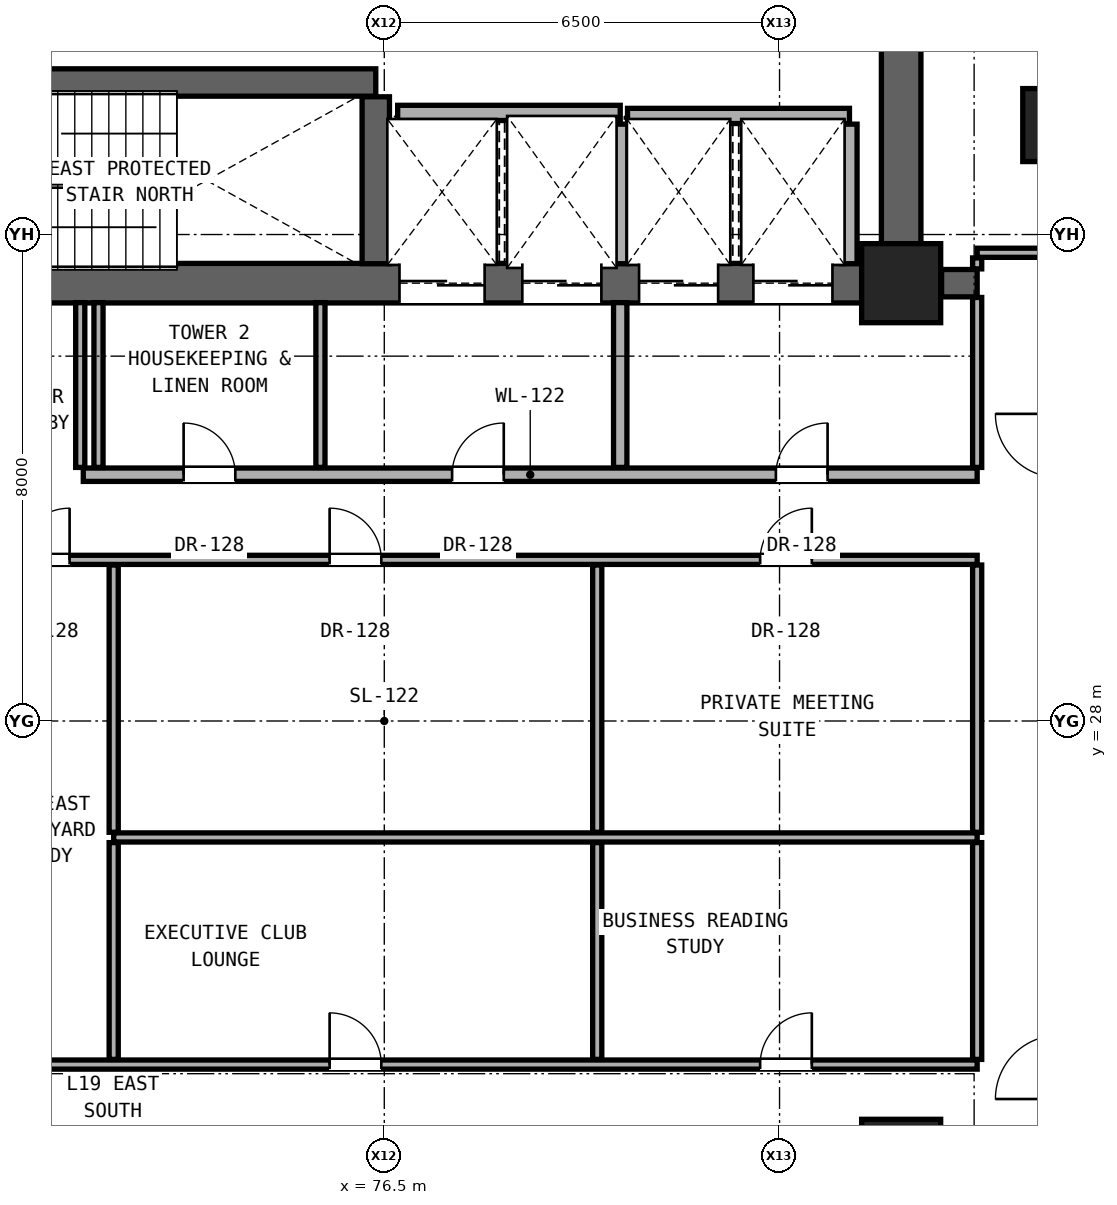
"""IFC4 building model, lengths in metres.
Left out: names, types, materials, properties, quantities, classifications, styles, units other than length and angle.
Written with IfcOpenShell. Run it as: python <this file> out.ifc"""

import sys

from ifc_helpers import new_model, si_unit, direction, frame, frame_2d, origin, origin_2d, place, context, subcontext, project, spatial, rectangle, extrude, element, fill, save


model = new_model("IFC4")
c1 = context("Model", 3, precision=1e-05, world=origin(), true_north=direction((0.0, 1.0)))
c2 = subcontext(c1, "Body", "Model", "MODEL_VIEW")
j1 = project(units=[si_unit("LENGTHUNIT", "METRE"), si_unit("PLANEANGLEUNIT", "RADIAN")], contexts=[c1])
p1 = place(None, origin())
s1 = spatial("IfcSite", under=j1, at=p1, CompositionType="ELEMENT")
p2 = place(p1, origin())
s2 = spatial("IfcBuilding", under=s1, at=p2, CompositionType="ELEMENT")
p3 = place(p2, frame((0.0, 0.0, 68.6)))
s3 = spatial("IfcBuildingStorey", under=s2, at=p3, CompositionType="ELEMENT", Elevation=68.6)
for number, where, z_axis, x_axis in (
    (1, (85.0, 20.8, 0.0), (0.0, 0.0, 1.0), (1.0, 0.0, 0.0)),
    (2, (85.0, 35.2, 0.0), (0.0, 0.0, 1.0), (1.0, 0.0, 0.0)),
):
    element("IfcColumn", number, at=place(p3, frame(where, z_axis=z_axis, x_axis=x_axis)), inside=s3, PredefinedType="COLUMN", context=c2, shape_type="SweptSolid", body=[
        extrude(rectangle(XDim=1.3, YDim=1.3, at=origin_2d()), origin(), (0.0, 0.0, 1.0), 3.3),
    ])
p4 = place(p3, frame((87.4, 37.8, 0.0), z_axis=(0.0, 0.0, 1.0), x_axis=(1.0, 0.0, 0.0)))
e3 = element("IfcColumn", 3, at=p4, inside=s3, PredefinedType="PILASTER", context=c2, shape_type="SweptSolid", body=[
    extrude(rectangle(XDim=0.8, YDim=1.2, at=origin_2d()), origin(), (0.0, 0.0, 1.0), 3.3),
])
p5 = place(p3, frame((85.0, 35.2, 0.0), z_axis=(0.0, 0.0, 1.0), x_axis=(0.0, 1.0, 0.0)))
e4 = element("IfcWall", 4, at=p5, inside=s3, PredefinedType="SHEAR", context=c2, shape_type="SweptSolid", body=[
    extrude(rectangle(XDim=5.6, YDim=0.65, at=frame_2d((2.8, 0.0))), origin(), (0.0, 0.0, 1.0), 3.06),
])
p6 = place(p3, frame((68.0, 35.2, 0.0), z_axis=(0.0, 0.0, 1.0), x_axis=(1.0, 0.0, 0.0)))
e5 = element("IfcWall", 5, at=p6, inside=s3, PredefinedType="SHEAR", context=c2, shape_type="SweptSolid", body=[
    extrude(rectangle(XDim=17.0, YDim=0.65, at=frame_2d((8.5, 0.0))), origin(), (0.0, 0.0, 1.0), 3.06),
])
p7 = place(p6, frame((1.06, 0.0, 0.0)))
e6 = element("IfcOpeningElement", 6, at=p7, cuts=e5, PredefinedType="OPENING", context=c2, shape_type="SweptSolid", body=[
    extrude(rectangle(XDim=1.15, YDim=2.2, at=frame_2d((0.575, 1.1))), frame((0.0, 0.335, 0.0), z_axis=(0.0, -1.0, 0.0), x_axis=(1.0, 0.0, 0.0)), (0.0, 0.0, 1.0), 0.67),
])
p8 = place(p6, frame((8.75, 0.0, 0.0)))
e7 = element("IfcOpeningElement", 7, at=p8, cuts=e5, PredefinedType="OPENING", context=c2, shape_type="SweptSolid", body=[
    extrude(rectangle(XDim=1.4, YDim=2.35, at=frame_2d((0.7, 1.175))), frame((0.0, 0.335, 0.0), z_axis=(0.0, -1.0, 0.0), x_axis=(1.0, 0.0, 0.0)), (0.0, 0.0, 1.0), 0.67),
])
p9 = place(p6, frame((10.77, 0.0, 0.0)))
e8 = element("IfcOpeningElement", 8, at=p9, cuts=e5, PredefinedType="OPENING", context=c2, shape_type="SweptSolid", body=[
    extrude(rectangle(XDim=1.3, YDim=2.3, at=frame_2d((0.65, 1.15))), frame((0.0, 0.335, 0.0), z_axis=(0.0, -1.0, 0.0), x_axis=(1.0, 0.0, 0.0)), (0.0, 0.0, 1.0), 0.67),
])
p10 = place(p6, frame((12.69, 0.0, 0.0)))
e9 = element("IfcOpeningElement", 9, at=p10, cuts=e5, PredefinedType="OPENING", context=c2, shape_type="SweptSolid", body=[
    extrude(rectangle(XDim=1.3, YDim=2.3, at=frame_2d((0.65, 1.15))), frame((0.0, 0.335, 0.0), z_axis=(0.0, -1.0, 0.0), x_axis=(1.0, 0.0, 0.0)), (0.0, 0.0, 1.0), 0.67),
])
p11 = place(p6, frame((14.57, 0.0, 0.0)))
e10 = element("IfcOpeningElement", 10, at=p11, cuts=e5, PredefinedType="OPENING", context=c2, shape_type="SweptSolid", body=[
    extrude(rectangle(XDim=1.3, YDim=2.3, at=frame_2d((0.65, 1.15))), frame((0.0, 0.335, 0.0), z_axis=(0.0, -1.0, 0.0), x_axis=(1.0, 0.0, 0.0)), (0.0, 0.0, 1.0), 0.67),
])
p12 = place(p3, frame((66.62, 22.35, 0.0), z_axis=(0.0, 0.0, 1.0), x_axis=(1.0, 0.0, 0.0)))
e11 = element("IfcWall", 11, at=p12, inside=s3, PredefinedType="PARTITIONING", context=c2, shape_type="SweptSolid", body=[
    extrude(rectangle(XDim=19.63, YDim=0.15, at=frame_2d((9.815, 0.0))), origin(), (0.0, 0.0, 1.0), 2.125),
])
p13 = place(p12, frame((8.981, 0.0, 0.0)))
e12 = element("IfcOpeningElement", 12, at=p13, cuts=e11, PredefinedType="OPENING", context=c2, shape_type="SweptSolid", body=[
    extrude(rectangle(XDim=0.85, YDim=2.01, at=frame_2d((0.425, 1.005))), frame((0.0, 0.085, 0.0), z_axis=(0.0, -1.0, 0.0), x_axis=(1.0, 0.0, 0.0)), (0.0, 0.0, 1.0), 0.17),
])
p14 = place(p12, frame((16.061, 0.0, 0.0)))
e13 = element("IfcOpeningElement", 13, at=p14, cuts=e11, PredefinedType="OPENING", context=c2, shape_type="SweptSolid", body=[
    extrude(rectangle(XDim=0.85, YDim=2.01, at=frame_2d((0.425, 1.005))), frame((0.0, 0.085, 0.0), z_axis=(0.0, -1.0, 0.0), x_axis=(1.0, 0.0, 0.0)), (0.0, 0.0, 1.0), 0.17),
])
p15 = place(p3, frame((72.05, 26.085, 0.0), z_axis=(0.0, 0.0, 1.0), x_axis=(1.0, 0.0, 0.0)))
e14 = element("IfcWall", 14, at=p15, inside=s3, PredefinedType="PARTITIONING", context=c2, shape_type="SweptSolid", body=[
    extrude(rectangle(XDim=14.2, YDim=0.15, at=frame_2d((7.1, 0.0))), origin(), (0.0, 0.0, 1.0), 2.125),
])
p16 = place(p3, frame((66.62, 30.65, 0.0), z_axis=(0.0, 0.0, 1.0), x_axis=(1.0, 0.0, 0.0)))
e15 = element("IfcWall", 15, at=p16, inside=s3, PredefinedType="PARTITIONING", context=c2, shape_type="SweptSolid", body=[
    extrude(rectangle(XDim=19.63, YDim=0.15, at=frame_2d((9.815, 0.0))), origin(), (0.0, 0.0, 1.0), 2.125),
])
p17 = place(p16, frame((3.855, 0.0, 0.0)))
e16 = element("IfcOpeningElement", 16, at=p17, cuts=e15, PredefinedType="OPENING", context=c2, shape_type="SweptSolid", body=[
    extrude(rectangle(XDim=0.85, YDim=2.01, at=frame_2d((0.425, 1.005))), frame((0.0, 0.085, 0.0), z_axis=(0.0, -1.0, 0.0), x_axis=(1.0, 0.0, 0.0)), (0.0, 0.0, 1.0), 0.17),
])
p18 = place(p16, frame((8.981, 0.0, 0.0)))
e17 = element("IfcOpeningElement", 17, at=p18, cuts=e15, PredefinedType="OPENING", context=c2, shape_type="SweptSolid", body=[
    extrude(rectangle(XDim=0.85, YDim=2.01, at=frame_2d((0.425, 1.005))), frame((0.0, 0.085, 0.0), z_axis=(0.0, -1.0, 0.0), x_axis=(1.0, 0.0, 0.0)), (0.0, 0.0, 1.0), 0.17),
])
p19 = place(p16, frame((16.061, 0.0, 0.0)))
e18 = element("IfcOpeningElement", 18, at=p19, cuts=e15, PredefinedType="OPENING", context=c2, shape_type="SweptSolid", body=[
    extrude(rectangle(XDim=0.85, YDim=2.01, at=frame_2d((0.425, 1.005))), frame((0.0, 0.085, 0.0), z_axis=(0.0, -1.0, 0.0), x_axis=(1.0, 0.0, 0.0)), (0.0, 0.0, 1.0), 0.17),
])
p20 = place(p3, frame((71.55, 32.05, 0.0), z_axis=(0.0, 0.0, 1.0), x_axis=(1.0, 0.0, 0.0)))
e19 = element("IfcWall", 19, at=p20, inside=s3, PredefinedType="SOLIDWALL", context=c2, shape_type="SweptSolid", body=[
    extrude(rectangle(XDim=14.7, YDim=0.22, at=frame_2d((7.35, 0.0))), origin(), (0.0, 0.0, 1.0), 2.125),
])
p21 = place(p20, frame((11.39, 0.0, 0.0)))
e20 = element("IfcOpeningElement", 20, at=p21, cuts=e19, PredefinedType="OPENING", context=c2, shape_type="SweptSolid", body=[
    extrude(rectangle(XDim=0.85, YDim=2.01, at=frame_2d((0.425, 1.005))), frame((0.0, 0.12, 0.0), z_axis=(0.0, -1.0, 0.0), x_axis=(1.0, 0.0, 0.0)), (0.0, 0.0, 1.0), 0.24),
])
p22 = place(p20, frame((6.065, 0.0, 0.0)))
e21 = element("IfcOpeningElement", 21, at=p22, cuts=e19, PredefinedType="OPENING", context=c2, shape_type="SweptSolid", body=[
    extrude(rectangle(XDim=0.85, YDim=2.01, at=frame_2d((0.425, 1.005))), frame((0.0, 0.12, 0.0), z_axis=(0.0, -1.0, 0.0), x_axis=(1.0, 0.0, 0.0)), (0.0, 0.0, 1.0), 0.24),
])
p23 = place(p20, frame((1.65, 0.0, 0.0)))
e22 = element("IfcOpeningElement", 22, at=p23, cuts=e19, PredefinedType="OPENING", context=c2, shape_type="SweptSolid", body=[
    extrude(rectangle(XDim=0.85, YDim=2.01, at=frame_2d((0.425, 1.005))), frame((0.0, 0.12, 0.0), z_axis=(0.0, -1.0, 0.0), x_axis=(1.0, 0.0, 0.0)), (0.0, 0.0, 1.0), 0.24),
])
p24 = place(p3, frame((85.665, 35.2, 0.0), z_axis=(0.0, 0.0, 1.0), x_axis=(1.0, 0.0, 0.0)))
e23 = element("IfcWall", 23, at=p24, inside=s3, PredefinedType="SHEAR", context=c2, shape_type="SweptSolid", body=[
    extrude(rectangle(XDim=0.585, YDim=0.45, at=frame_2d((0.292, 0.0))), origin(), (0.0, 0.0, 1.0), 3.06),
])
p25 = place(p3, frame((86.25, 35.7, 0.0), z_axis=(0.0, 0.0, 1.0), x_axis=(1.0, 0.0, 0.0)))
e24 = element("IfcWall", 24, at=p25, inside=s3, PredefinedType="PARTITIONING", context=c2, shape_type="SweptSolid", body=[
    extrude(rectangle(XDim=1.35, YDim=0.15, at=frame_2d((0.675, 0.0))), origin(), (0.0, 0.0, 1.0), 3.06),
])
p26 = place(p3, frame((80.5, 37.95, 0.0), z_axis=(0.0, 0.0, 1.0), x_axis=(1.0, 0.0, 0.0)))
e25 = element("IfcWall", 25, at=p26, inside=s3, PredefinedType="SOLIDWALL", context=c2, shape_type="SweptSolid", body=[
    extrude(rectangle(XDim=3.65, YDim=0.25, at=frame_2d((1.825, 0.0))), origin(), (0.0, 0.0, 1.0), 3.06),
])
p27 = place(p3, frame((76.72, 38.0, 0.0), z_axis=(0.0, 0.0, 1.0), x_axis=(1.0, 0.0, 0.0)))
e26 = element("IfcWall", 26, at=p27, inside=s3, PredefinedType="SOLIDWALL", context=c2, shape_type="SweptSolid", body=[
    extrude(rectangle(XDim=3.66, YDim=0.25, at=frame_2d((1.83, 0.0))), origin(), (0.0, 0.0, 1.0), 3.06),
])
p28 = place(p3, frame((68.32, 38.5, 0.0), z_axis=(0.0, 0.0, 1.0), x_axis=(1.0, 0.0, 0.0)))
e27 = element("IfcWall", 27, at=p28, inside=s3, PredefinedType="SHEAR", context=c2, shape_type="SweptSolid", body=[
    extrude(rectangle(XDim=8.04, YDim=0.45, at=frame_2d((4.02, 0.0))), origin(), (0.0, 0.0, 1.0), 3.06),
])
for number, where, z_axis, x_axis in (
    (28, (71.5, 32.17, 0.0), (0.0, 0.0, 1.0), (0.0, 1.0, 0.0)),
    (29, (71.8, 32.17, 0.0), (0.0, 0.0, 1.0), (0.0, 1.0, 0.0)),
):
    element("IfcWall", number, at=place(p3, frame(where, z_axis=z_axis, x_axis=x_axis)), inside=s3, PredefinedType="PARTITIONING", context=c2, shape_type="SweptSolid", body=[
        extrude(rectangle(XDim=2.71, YDim=0.15, at=frame_2d((1.355, 0.0))), origin(), (0.0, 0.0, 1.0), 3.06),
    ])
p29 = place(p3, frame((72.05, 22.435, 0.0), z_axis=(0.0, 0.0, 1.0), x_axis=(0.0, 1.0, 0.0)))
e30 = element("IfcWall", 30, at=p29, inside=s3, PredefinedType="PARTITIONING", context=c2, shape_type="SweptSolid", body=[
    extrude(rectangle(XDim=3.565, YDim=0.15, at=frame_2d((1.782, 0.0))), origin(), (0.0, 0.0, 1.0), 2.589),
])
p30 = place(p3, frame((72.05, 26.17, 0.0), z_axis=(0.0, 0.0, 1.0), x_axis=(0.0, 1.0, 0.0)))
e31 = element("IfcWall", 31, at=p30, inside=s3, PredefinedType="PARTITIONING", context=c2, shape_type="SweptSolid", body=[
    extrude(rectangle(XDim=4.395, YDim=0.15, at=frame_2d((2.198, 0.0))), origin(), (0.0, 0.0, 1.0), 2.125),
])
p31 = place(p3, frame((75.45, 32.17, 0.0), z_axis=(0.0, 0.0, 1.0), x_axis=(0.0, 1.0, 0.0)))
e32 = element("IfcWall", 32, at=p31, inside=s3, PredefinedType="PARTITIONING", context=c2, shape_type="SweptSolid", body=[
    extrude(rectangle(XDim=2.71, YDim=0.15, at=frame_2d((1.355, 0.0))), origin(), (0.0, 0.0, 1.0), 3.06),
])
p32 = place(p3, frame((76.36, 35.52, 0.0), z_axis=(0.0, 0.0, 1.0), x_axis=(0.0, 1.0, 0.0)))
e33 = element("IfcWall", 33, at=p32, inside=s3, PredefinedType="SHEAR", context=c2, shape_type="SweptSolid", body=[
    extrude(rectangle(XDim=2.745, YDim=0.45, at=frame_2d((1.373, 0.0))), origin(), (0.0, 0.0, 1.0), 3.06),
])
p33 = place(p3, frame((80.002, 22.435, 0.0), z_axis=(0.0, 0.0, 1.0), x_axis=(0.0, 1.0, 0.0)))
e34 = element("IfcWall", 34, at=p33, inside=s3, PredefinedType="PARTITIONING", context=c2, shape_type="SweptSolid", body=[
    extrude(rectangle(XDim=3.565, YDim=0.15, at=frame_2d((1.782, 0.0))), origin(), (0.0, 0.0, 1.0), 3.06),
])
p34 = place(p3, frame((80.002, 26.17, 0.0), z_axis=(0.0, 0.0, 1.0), x_axis=(0.0, 1.0, 0.0)))
e35 = element("IfcWall", 35, at=p34, inside=s3, PredefinedType="PARTITIONING", context=c2, shape_type="SweptSolid", body=[
    extrude(rectangle(XDim=4.395, YDim=0.15, at=frame_2d((2.198, 0.0))), origin(), (0.0, 0.0, 1.0), 2.125),
])
p35 = place(p3, frame((80.38, 32.17, 0.0), z_axis=(0.0, 0.0, 1.0), x_axis=(0.0, 1.0, 0.0)))
e36 = element("IfcWall", 36, at=p35, inside=s3, PredefinedType="SOLIDWALL", context=c2, shape_type="SweptSolid", body=[
    extrude(rectangle(XDim=2.71, YDim=0.22, at=frame_2d((1.355, 0.0))), origin(), (0.0, 0.0, 1.0), 3.06),
])
for number, where, z_axis, x_axis in (
    (37, (80.38, 35.52, 0.0), (0.0, 0.0, 1.0), (0.0, 1.0, 0.0)),
    (38, (84.15, 35.52, 0.0), (0.0, 0.0, 1.0), (0.0, 1.0, 0.0)),
):
    element("IfcWall", number, at=place(p3, frame(where, z_axis=z_axis, x_axis=x_axis)), inside=s3, PredefinedType="SOLIDWALL", context=c2, shape_type="SweptSolid", body=[
        extrude(rectangle(XDim=2.295, YDim=0.25, at=frame_2d((1.147, 0.0))), origin(), (0.0, 0.0, 1.0), 3.06),
    ])
p36 = place(p3, frame((86.25, 22.435, 0.0), z_axis=(0.0, 0.0, 1.0), x_axis=(0.0, 1.0, 0.0)))
e39 = element("IfcWall", 39, at=p36, inside=s3, PredefinedType="PARTITIONING", context=c2, shape_type="SweptSolid", body=[
    extrude(rectangle(XDim=3.565, YDim=0.15, at=frame_2d((1.782, 0.0))), origin(), (0.0, 0.0, 1.0), 3.06),
])
p37 = place(p3, frame((86.25, 26.17, 0.0), z_axis=(0.0, 0.0, 1.0), x_axis=(0.0, 1.0, 0.0)))
e40 = element("IfcWall", 40, at=p37, inside=s3, PredefinedType="PARTITIONING", context=c2, shape_type="SweptSolid", body=[
    extrude(rectangle(XDim=4.395, YDim=0.15, at=frame_2d((2.198, 0.0))), origin(), (0.0, 0.0, 1.0), 2.279),
])
p38 = place(p3, frame((86.25, 32.17, 0.0), z_axis=(0.0, 0.0, 1.0), x_axis=(0.0, 1.0, 0.0)))
e41 = element("IfcWall", 41, at=p38, inside=s3, PredefinedType="PARTITIONING", context=c2, shape_type="SweptSolid", body=[
    extrude(rectangle(XDim=2.795, YDim=0.15, at=frame_2d((1.397, 0.0))), origin(), (0.0, 0.0, 1.0), 2.452),
])
p39 = place(p3, frame((86.25, 35.435, 0.0), z_axis=(0.0, 0.0, 1.0), x_axis=(0.0, 1.0, 0.0)))
e42 = element("IfcWall", 42, at=p39, inside=s3, PredefinedType="PARTITIONING", context=c2, shape_type="SweptSolid", body=[
    extrude(rectangle(XDim=0.18, YDim=0.15, at=frame_2d((0.09, 0.0))), origin(), (0.0, 0.0, 1.0), 2.452),
])
p40 = place(p21, origin())
e43 = element("IfcDoor", 43, at=p40, inside=s3, OperationType="SINGLE_SWING_RIGHT", PredefinedType="DOOR", context=c2, shape_type="SweptSolid", body=[
    extrude(rectangle(XDim=0.85, YDim=2.01, at=frame_2d((0.425, 1.005))), frame((0.0, 0.025, 0.0), z_axis=(0.0, -1.0, 0.0), x_axis=(1.0, 0.0, 0.0)), (0.0, 0.0, 1.0), 0.05),
])
fill(e20, e43)
p41 = place(p22, origin())
e44 = element("IfcDoor", 44, at=p41, inside=s3, OperationType="SINGLE_SWING_RIGHT", PredefinedType="DOOR", context=c2, shape_type="SweptSolid", body=[
    extrude(rectangle(XDim=0.85, YDim=2.01, at=frame_2d((0.425, 1.005))), frame((0.0, 0.025, 0.0), z_axis=(0.0, -1.0, 0.0), x_axis=(1.0, 0.0, 0.0)), (0.0, 0.0, 1.0), 0.05),
])
fill(e21, e44)
p42 = place(p23, origin())
e45 = element("IfcDoor", 45, at=p42, inside=s3, OperationType="SINGLE_SWING_LEFT", PredefinedType="DOOR", context=c2, shape_type="SweptSolid", body=[
    extrude(rectangle(XDim=0.85, YDim=2.01, at=frame_2d((0.425, 1.005))), frame((0.0, 0.025, 0.0), z_axis=(0.0, -1.0, 0.0), x_axis=(1.0, 0.0, 0.0)), (0.0, 0.0, 1.0), 0.05),
])
fill(e22, e45)
p43 = place(p17, origin())
e46 = element("IfcDoor", 46, at=p43, inside=s3, OperationType="SINGLE_SWING_RIGHT", PredefinedType="DOOR", context=c2, shape_type="SweptSolid", body=[
    extrude(rectangle(XDim=0.85, YDim=2.01, at=frame_2d((0.425, 1.005))), frame((0.0, 0.025, 0.0), z_axis=(0.0, -1.0, 0.0), x_axis=(1.0, 0.0, 0.0)), (0.0, 0.0, 1.0), 0.05),
])
fill(e16, e46)
p44 = place(p13, origin())
e47 = element("IfcDoor", 47, at=p44, inside=s3, OperationType="SINGLE_SWING_LEFT", PredefinedType="DOOR", context=c2, shape_type="SweptSolid", body=[
    extrude(rectangle(XDim=0.85, YDim=2.01, at=frame_2d((0.425, 1.005))), frame((0.0, 0.025, 0.0), z_axis=(0.0, -1.0, 0.0), x_axis=(1.0, 0.0, 0.0)), (0.0, 0.0, 1.0), 0.05),
])
fill(e12, e47)
p45 = place(p14, origin())
e48 = element("IfcDoor", 48, at=p45, inside=s3, OperationType="SINGLE_SWING_RIGHT", PredefinedType="DOOR", context=c2, shape_type="SweptSolid", body=[
    extrude(rectangle(XDim=0.85, YDim=2.01, at=frame_2d((0.425, 1.005))), frame((0.0, 0.025, 0.0), z_axis=(0.0, -1.0, 0.0), x_axis=(1.0, 0.0, 0.0)), (0.0, 0.0, 1.0), 0.05),
])
fill(e13, e48)
p46 = place(p18, origin())
e49 = element("IfcDoor", 49, at=p46, inside=s3, OperationType="SINGLE_SWING_LEFT", PredefinedType="DOOR", context=c2, shape_type="SweptSolid", body=[
    extrude(rectangle(XDim=0.85, YDim=2.01, at=frame_2d((0.425, 1.005))), frame((0.0, 0.025, 0.0), z_axis=(0.0, -1.0, 0.0), x_axis=(1.0, 0.0, 0.0)), (0.0, 0.0, 1.0), 0.05),
])
fill(e17, e49)
p47 = place(p19, origin())
e50 = element("IfcDoor", 50, at=p47, inside=s3, OperationType="SINGLE_SWING_RIGHT", PredefinedType="DOOR", context=c2, shape_type="SweptSolid", body=[
    extrude(rectangle(XDim=0.85, YDim=2.01, at=frame_2d((0.425, 1.005))), frame((0.0, 0.025, 0.0), z_axis=(0.0, -1.0, 0.0), x_axis=(1.0, 0.0, 0.0)), (0.0, 0.0, 1.0), 0.05),
])
fill(e18, e50)
p48 = place(p8, origin())
e51 = element("IfcDoor", 51, at=p48, inside=s3, OperationType="DOUBLE_DOOR_SLIDING", PredefinedType="DOOR", context=c2, shape_type="SweptSolid", body=[
    extrude(rectangle(XDim=1.4, YDim=2.35, at=frame_2d((0.7, 1.175))), frame((0.0, 0.025, 0.0), z_axis=(0.0, -1.0, 0.0), x_axis=(1.0, 0.0, 0.0)), (0.0, 0.0, 1.0), 0.05),
])
fill(e7, e51)
p49 = place(p9, origin())
e52 = element("IfcDoor", 52, at=p49, inside=s3, OperationType="DOUBLE_DOOR_SLIDING", PredefinedType="DOOR", context=c2, shape_type="SweptSolid", body=[
    extrude(rectangle(XDim=1.3, YDim=2.3, at=frame_2d((0.65, 1.15))), frame((0.0, 0.025, 0.0), z_axis=(0.0, -1.0, 0.0), x_axis=(1.0, 0.0, 0.0)), (0.0, 0.0, 1.0), 0.05),
])
fill(e8, e52)
p50 = place(p10, origin())
e53 = element("IfcDoor", 53, at=p50, inside=s3, OperationType="DOUBLE_DOOR_SLIDING", PredefinedType="DOOR", context=c2, shape_type="SweptSolid", body=[
    extrude(rectangle(XDim=1.3, YDim=2.3, at=frame_2d((0.65, 1.15))), frame((0.0, 0.025, 0.0), z_axis=(0.0, -1.0, 0.0), x_axis=(1.0, 0.0, 0.0)), (0.0, 0.0, 1.0), 0.05),
])
fill(e9, e53)
p51 = place(p11, origin())
e54 = element("IfcDoor", 54, at=p51, inside=s3, OperationType="DOUBLE_DOOR_SLIDING", PredefinedType="DOOR", context=c2, shape_type="SweptSolid", body=[
    extrude(rectangle(XDim=1.3, YDim=2.3, at=frame_2d((0.65, 1.15))), frame((0.0, 0.025, 0.0), z_axis=(0.0, -1.0, 0.0), x_axis=(1.0, 0.0, 0.0)), (0.0, 0.0, 1.0), 0.05),
])
fill(e10, e54)
save(model, sys.argv[1])
